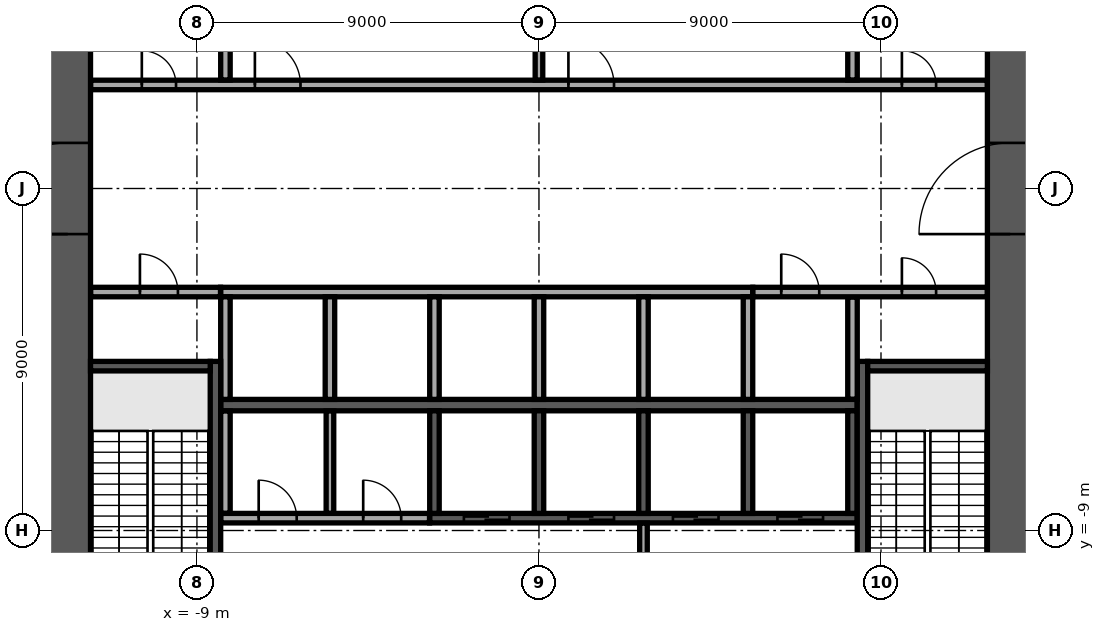
"""IFC4 building model, lengths in metres.
Left out: names, types, materials, properties, quantities, classifications, styles, units other than length and angle.
Written with IfcOpenShell. Run it as: python <this file> out.ifc"""

import sys

from ifc_helpers import new_model, si_unit, direction, frame, frame_2d, origin, place, context, subcontext, project, spatial, rectangle, extrude, element, fill, save


model = new_model("IFC4")
c1 = context("Model", 3, precision=1e-05, world=origin(), true_north=direction((0.0, 1.0)))
c2 = subcontext(c1, "Body", "Model", "MODEL_VIEW")
j1 = project(units=[si_unit("LENGTHUNIT", "METRE"), si_unit("PLANEANGLEUNIT", "RADIAN")], contexts=[c1])
p1 = place(None, origin())
s1 = spatial("IfcSite", under=j1, at=p1, CompositionType="ELEMENT")
p2 = place(p1, origin())
s2 = spatial("IfcBuilding", under=s1, at=p2, CompositionType="ELEMENT")
p3 = place(p2, frame((0.0, 0.0, 76.5)))
s3 = spatial("IfcBuildingStorey", under=s2, at=p3, CompositionType="ELEMENT", Elevation=76.5)
p4 = place(p3, frame((12.4, -11.8, 0.0), z_axis=(0.0, 0.0, 1.0), x_axis=(0.0, 1.0, 0.0)))
e1 = element("IfcWall", 1, at=p4, inside=s3, PredefinedType="SHEAR", context=c2, shape_type="SweptSolid", body=[
    extrude(rectangle(XDim=23.6, YDim=1.2, at=frame_2d((11.8, 0.0))), origin(), (0.0, 0.0, 1.0), 5.18),
])
p5 = place(p4, frame((10.6, 0.0, 0.0)))
e2 = element("IfcOpeningElement", 2, at=p5, cuts=e1, PredefinedType="OPENING", context=c2, shape_type="SweptSolid", body=[
    extrude(rectangle(XDim=2.4, YDim=2.4, at=frame_2d((1.2, 1.2))), frame((0.0, 0.61, 0.0), z_axis=(0.0, -1.0, 0.0), x_axis=(1.0, 0.0, 0.0)), (0.0, 0.0, 1.0), 1.22),
])
p6 = place(p3, frame((-12.4, -11.8, 0.0), z_axis=(0.0, 0.0, 1.0), x_axis=(0.0, 1.0, 0.0)))
e3 = element("IfcWall", 3, at=p6, inside=s3, PredefinedType="SHEAR", context=c2, shape_type="SweptSolid", body=[
    extrude(rectangle(XDim=23.6, YDim=1.2, at=frame_2d((11.8, 0.0))), origin(), (0.0, 0.0, 1.0), 5.18),
])
p7 = place(p6, frame((10.6, 0.0, 0.0)))
e4 = element("IfcOpeningElement", 4, at=p7, cuts=e3, PredefinedType="OPENING", context=c2, shape_type="SweptSolid", body=[
    extrude(rectangle(XDim=2.4, YDim=2.4, at=frame_2d((1.2, 1.2))), frame((0.0, 0.61, 0.0), z_axis=(0.0, -1.0, 0.0), x_axis=(1.0, 0.0, 0.0)), (0.0, 0.0, 1.0), 1.22),
])
p8 = place(p3, frame((-8.375, -5.7, 0.0), z_axis=(0.0, 0.0, 1.0), x_axis=(1.0, 0.0, 0.0)))
e5 = element("IfcWall", 5, at=p8, inside=s3, PredefinedType="SOLIDWALL", context=c2, shape_type="SweptSolid", body=[
    extrude(rectangle(XDim=16.75, YDim=0.3, at=frame_2d((8.375, 0.0))), origin(), (0.0, 0.0, 1.0), 5.18),
])
p9 = place(p3, frame((-8.375, -2.725, 0.0), z_axis=(0.0, 0.0, 1.0), x_axis=(1.0, 0.0, 0.0)))
e6 = element("IfcWall", 6, at=p9, inside=s3, PredefinedType="SOLIDWALL", context=c2, shape_type="SweptSolid", body=[
    extrude(rectangle(XDim=14.0, YDim=0.25, at=frame_2d((7.0, 0.0))), origin(), (0.0, 0.0, 1.0), 5.18),
])
for number, where, z_axis, x_axis in (
    (7, (-8.25, -5.55, 0.0), (0.0, 0.0, 1.0), (0.0, 1.0, 0.0)),
    (8, (-5.5, -5.55, 0.0), (0.0, 0.0, 1.0), (0.0, 1.0, 0.0)),
    (9, (-2.75, -5.55, 0.0), (0.0, 0.0, 1.0), (0.0, 1.0, 0.0)),
    (10, (0.0, -5.55, 0.0), (0.0, 0.0, 1.0), (0.0, 1.0, 0.0)),
    (11, (2.75, -5.55, 0.0), (0.0, 0.0, 1.0), (0.0, 1.0, 0.0)),
    (12, (5.5, -5.55, 0.0), (0.0, 0.0, 1.0), (0.0, 1.0, 0.0)),
):
    element("IfcWall", number, at=place(p3, frame(where, z_axis=z_axis, x_axis=x_axis)), inside=s3, PredefinedType="SOLIDWALL", context=c2, shape_type="SweptSolid", body=[
        extrude(rectangle(XDim=2.7, YDim=0.25, at=frame_2d((1.35, 0.0))), origin(), (0.0, 0.0, 1.0), 5.18),
    ])
p10 = place(p3, frame((-2.875, -8.675, 0.0), z_axis=(0.0, 0.0, 1.0), x_axis=(1.0, 0.0, 0.0)))
e13 = element("IfcWall", 13, at=p10, inside=s3, PredefinedType="SOLIDWALL", context=c2, shape_type="SweptSolid", body=[
    extrude(rectangle(XDim=11.25, YDim=0.25, at=frame_2d((5.625, 0.0))), origin(), (0.0, 0.0, 1.0), 5.18),
])
p11 = place(p10, frame((0.9, 0.0, 0.0)))
e14 = element("IfcOpeningElement", 14, at=p11, cuts=e13, PredefinedType="OPENING", context=c2, shape_type="SweptSolid", body=[
    extrude(rectangle(XDim=1.2, YDim=2.1, at=frame_2d((0.6, 1.05))), frame((0.0, 0.135, 0.0), z_axis=(0.0, -1.0, 0.0), x_axis=(1.0, 0.0, 0.0)), (0.0, 0.0, 1.0), 0.27),
])
p12 = place(p10, frame((3.65, 0.0, 0.0)))
e15 = element("IfcOpeningElement", 15, at=p12, cuts=e13, PredefinedType="OPENING", context=c2, shape_type="SweptSolid", body=[
    extrude(rectangle(XDim=1.2, YDim=2.1, at=frame_2d((0.6, 1.05))), frame((0.0, 0.135, 0.0), z_axis=(0.0, -1.0, 0.0), x_axis=(1.0, 0.0, 0.0)), (0.0, 0.0, 1.0), 0.27),
])
p13 = place(p10, frame((6.4, 0.0, 0.0)))
e16 = element("IfcOpeningElement", 16, at=p13, cuts=e13, PredefinedType="OPENING", context=c2, shape_type="SweptSolid", body=[
    extrude(rectangle(XDim=1.2, YDim=2.1, at=frame_2d((0.6, 1.05))), frame((0.0, 0.135, 0.0), z_axis=(0.0, -1.0, 0.0), x_axis=(1.0, 0.0, 0.0)), (0.0, 0.0, 1.0), 0.27),
])
p14 = place(p10, frame((9.15, 0.0, 0.0)))
e17 = element("IfcOpeningElement", 17, at=p14, cuts=e13, PredefinedType="OPENING", context=c2, shape_type="SweptSolid", body=[
    extrude(rectangle(XDim=1.2, YDim=2.1, at=frame_2d((0.6, 1.05))), frame((0.0, 0.135, 0.0), z_axis=(0.0, -1.0, 0.0), x_axis=(1.0, 0.0, 0.0)), (0.0, 0.0, 1.0), 0.27),
])
for number, where, z_axis, x_axis in (
    (18, (-2.75, -8.55, 0.0), (0.0, 0.0, 1.0), (0.0, 1.0, 0.0)),
    (19, (0.0, -8.55, 0.0), (0.0, 0.0, 1.0), (0.0, 1.0, 0.0)),
    (20, (2.75, -8.55, 0.0), (0.0, 0.0, 1.0), (0.0, 1.0, 0.0)),
    (21, (5.5, -8.55, 0.0), (0.0, 0.0, 1.0), (0.0, 1.0, 0.0)),
    (22, (8.25, -8.55, 0.0), (0.0, 0.0, 1.0), (0.0, 1.0, 0.0)),
):
    element("IfcWall", number, at=place(p3, frame(where, z_axis=z_axis, x_axis=x_axis)), inside=s3, PredefinedType="SOLIDWALL", context=c2, shape_type="SweptSolid", body=[
        extrude(rectangle(XDim=2.7, YDim=0.25, at=frame_2d((1.35, 0.0))), origin(), (0.0, 0.0, 1.0), 5.18),
    ])
p15 = place(p3, frame((-8.512, -4.55, 0.0), z_axis=(0.0, 0.0, 1.0), x_axis=(0.0, -1.0, 0.0)))
e23 = element("IfcWall", 23, at=p15, inside=s3, PredefinedType="SOLIDWALL", context=c2, shape_type="SweptSolid", body=[
    extrude(rectangle(XDim=7.25, YDim=0.275, at=frame_2d((3.625, 0.0))), origin(), (0.0, 0.0, 1.0), 5.18),
])
p16 = place(p15, frame((6.0, 0.0, 0.0)))
e24 = element("IfcOpeningElement", 24, at=p16, cuts=e23, PredefinedType="OPENING", context=c2, shape_type="SweptSolid", body=[
    extrude(rectangle(XDim=1.0, YDim=2.1, at=frame_2d((0.5, 1.05))), frame((0.0, 0.147, 0.0), z_axis=(0.0, -1.0, 0.0), x_axis=(1.0, 0.0, 0.0)), (0.0, 0.0, 1.0), 0.295),
])
p17 = place(p3, frame((-8.65, -4.675, 0.0), z_axis=(0.0, 0.0, 1.0), x_axis=(-1.0, 0.0, 0.0)))
e25 = element("IfcWall", 25, at=p17, inside=s3, PredefinedType="SOLIDWALL", context=c2, shape_type="SweptSolid", body=[
    extrude(rectangle(XDim=3.15, YDim=0.25, at=frame_2d((1.575, 0.0))), origin(), (0.0, 0.0, 1.0), 5.18),
])
p18 = place(p3, frame((8.512, -4.55, 0.0), z_axis=(0.0, 0.0, 1.0), x_axis=(0.0, -1.0, 0.0)))
e26 = element("IfcWall", 26, at=p18, inside=s3, PredefinedType="SOLIDWALL", context=c2, shape_type="SweptSolid", body=[
    extrude(rectangle(XDim=7.25, YDim=0.275, at=frame_2d((3.625, 0.0))), origin(), (0.0, 0.0, 1.0), 5.18),
])
p19 = place(p18, frame((6.0, 0.0, 0.0)))
e27 = element("IfcOpeningElement", 27, at=p19, cuts=e26, PredefinedType="OPENING", context=c2, shape_type="SweptSolid", body=[
    extrude(rectangle(XDim=1.0, YDim=2.1, at=frame_2d((0.5, 1.05))), frame((0.0, 0.147, 0.0), z_axis=(0.0, -1.0, 0.0), x_axis=(1.0, 0.0, 0.0)), (0.0, 0.0, 1.0), 0.295),
])
p20 = place(p3, frame((8.65, -4.675, 0.0), z_axis=(0.0, 0.0, 1.0), x_axis=(1.0, 0.0, 0.0)))
e28 = element("IfcWall", 28, at=p20, inside=s3, PredefinedType="SOLIDWALL", context=c2, shape_type="SweptSolid", body=[
    extrude(rectangle(XDim=3.15, YDim=0.25, at=frame_2d((1.575, 0.0))), origin(), (0.0, 0.0, 1.0), 5.18),
])
p21 = place(p3, frame((2.75, -11.795, 0.0), z_axis=(0.0, 0.0, 1.0), x_axis=(0.0, 1.0, 0.0)))
e29 = element("IfcWall", 29, at=p21, inside=s3, PredefinedType="PARTITIONING", context=c2, shape_type="SweptSolid", body=[
    extrude(rectangle(XDim=2.99, YDim=0.2, at=frame_2d((1.495, 0.0))), origin(), (0.0, 0.0, 1.0), 5.18),
])
p22 = place(p3, frame((-8.37, -8.675, 0.0), z_axis=(0.0, 0.0, 1.0), x_axis=(1.0, 0.0, 0.0)))
e30 = element("IfcWall", 30, at=p22, inside=s3, PredefinedType="PARTITIONING", context=c2, shape_type="SweptSolid", body=[
    extrude(rectangle(XDim=5.49, YDim=0.25, at=frame_2d((2.745, 0.0))), origin(), (0.0, 0.0, 1.0), 5.18),
])
p23 = place(p22, frame((0.995, 0.0, 0.0)))
e31 = element("IfcOpeningElement", 31, at=p23, cuts=e30, PredefinedType="OPENING", context=c2, shape_type="SweptSolid", body=[
    extrude(rectangle(XDim=1.0, YDim=2.1, at=frame_2d((0.5, 1.05))), frame((0.0, 0.135, 0.0), z_axis=(0.0, -1.0, 0.0), x_axis=(1.0, 0.0, 0.0)), (0.0, 0.0, 1.0), 0.27),
])
p24 = place(p22, frame((3.745, 0.0, 0.0)))
e32 = element("IfcOpeningElement", 32, at=p24, cuts=e30, PredefinedType="OPENING", context=c2, shape_type="SweptSolid", body=[
    extrude(rectangle(XDim=1.0, YDim=2.1, at=frame_2d((0.5, 1.05))), frame((0.0, 0.135, 0.0), z_axis=(0.0, -1.0, 0.0), x_axis=(1.0, 0.0, 0.0)), (0.0, 0.0, 1.0), 0.27),
])
p25 = place(p3, frame((-8.25, -8.545, 0.0), z_axis=(0.0, 0.0, 1.0), x_axis=(0.0, 1.0, 0.0)))
e33 = element("IfcWall", 33, at=p25, inside=s3, PredefinedType="PARTITIONING", context=c2, shape_type="SweptSolid", body=[
    extrude(rectangle(XDim=2.69, YDim=0.25, at=frame_2d((1.345, 0.0))), origin(), (0.0, 0.0, 1.0), 5.18),
])
p26 = place(p3, frame((-5.5, -8.545, 0.0), z_axis=(0.0, 0.0, 1.0), x_axis=(0.0, 1.0, 0.0)))
e34 = element("IfcWall", 34, at=p26, inside=s3, PredefinedType="PARTITIONING", context=c2, shape_type="SweptSolid", body=[
    extrude(rectangle(XDim=2.69, YDim=0.2, at=frame_2d((1.345, 0.0))), origin(), (0.0, 0.0, 1.0), 5.18),
])
p27 = place(p3, frame((8.25, -5.545, 0.0), z_axis=(0.0, 0.0, 1.0), x_axis=(0.0, 1.0, 0.0)))
e35 = element("IfcWall", 35, at=p27, inside=s3, PredefinedType="PARTITIONING", context=c2, shape_type="SweptSolid", body=[
    extrude(rectangle(XDim=2.69, YDim=0.25, at=frame_2d((1.345, 0.0))), origin(), (0.0, 0.0, 1.0), 5.18),
])
p28 = place(p3, frame((-11.795, -2.725, 0.0), z_axis=(0.0, 0.0, 1.0), x_axis=(1.0, 0.0, 0.0)))
e36 = element("IfcWall", 36, at=p28, inside=s3, PredefinedType="PARTITIONING", context=c2, shape_type="SweptSolid", body=[
    extrude(rectangle(XDim=3.415, YDim=0.25, at=frame_2d((1.708, 0.0))), origin(), (0.0, 0.0, 1.0), 5.18),
])
p29 = place(p28, frame((1.295, 0.0, 0.0)))
e37 = element("IfcOpeningElement", 37, at=p29, cuts=e36, PredefinedType="OPENING", context=c2, shape_type="SweptSolid", body=[
    extrude(rectangle(XDim=1.0, YDim=2.1, at=frame_2d((0.5, 1.05))), frame((0.0, 0.135, 0.0), z_axis=(0.0, -1.0, 0.0), x_axis=(1.0, 0.0, 0.0)), (0.0, 0.0, 1.0), 0.27),
])
p30 = place(p3, frame((5.63, -2.725, 0.0), z_axis=(0.0, 0.0, 1.0), x_axis=(1.0, 0.0, 0.0)))
e38 = element("IfcWall", 38, at=p30, inside=s3, PredefinedType="PARTITIONING", context=c2, shape_type="SweptSolid", body=[
    extrude(rectangle(XDim=6.165, YDim=0.25, at=frame_2d((3.083, 0.0))), origin(), (0.0, 0.0, 1.0), 5.18),
])
p31 = place(p30, frame((0.745, 0.0, 0.0)))
e39 = element("IfcOpeningElement", 39, at=p31, cuts=e38, PredefinedType="OPENING", context=c2, shape_type="SweptSolid", body=[
    extrude(rectangle(XDim=1.0, YDim=2.1, at=frame_2d((0.5, 1.05))), frame((0.0, 0.135, 0.0), z_axis=(0.0, -1.0, 0.0), x_axis=(1.0, 0.0, 0.0)), (0.0, 0.0, 1.0), 0.27),
])
p32 = place(p30, frame((3.92, 0.0, 0.0)))
e40 = element("IfcOpeningElement", 40, at=p32, cuts=e38, PredefinedType="OPENING", context=c2, shape_type="SweptSolid", body=[
    extrude(rectangle(XDim=0.9, YDim=2.1, at=frame_2d((0.45, 1.05))), frame((0.0, 0.135, 0.0), z_axis=(0.0, -1.0, 0.0), x_axis=(1.0, 0.0, 0.0)), (0.0, 0.0, 1.0), 0.27),
])
p33 = place(p3, frame((-11.795, 2.725, 0.0), z_axis=(0.0, 0.0, 1.0), x_axis=(1.0, 0.0, 0.0)))
e41 = element("IfcWall", 41, at=p33, inside=s3, PredefinedType="PARTITIONING", context=c2, shape_type="SweptSolid", body=[
    extrude(rectangle(XDim=23.59, YDim=0.25, at=frame_2d((11.795, 0.0))), origin(), (0.0, 0.0, 1.0), 5.18),
])
p34 = place(p33, frame((21.345, 0.0, 0.0)))
e42 = element("IfcOpeningElement", 42, at=p34, cuts=e41, PredefinedType="OPENING", context=c2, shape_type="SweptSolid", body=[
    extrude(rectangle(XDim=0.9, YDim=2.1, at=frame_2d((0.45, 1.05))), frame((0.0, 0.135, 0.0), z_axis=(0.0, -1.0, 0.0), x_axis=(1.0, 0.0, 0.0)), (0.0, 0.0, 1.0), 0.27),
])
p35 = place(p33, frame((1.345, 0.0, 0.0)))
e43 = element("IfcOpeningElement", 43, at=p35, cuts=e41, PredefinedType="OPENING", context=c2, shape_type="SweptSolid", body=[
    extrude(rectangle(XDim=0.9, YDim=2.1, at=frame_2d((0.45, 1.05))), frame((0.0, 0.135, 0.0), z_axis=(0.0, -1.0, 0.0), x_axis=(1.0, 0.0, 0.0)), (0.0, 0.0, 1.0), 0.27),
])
p36 = place(p33, frame((4.32, 0.0, 0.0)))
e44 = element("IfcOpeningElement", 44, at=p36, cuts=e41, PredefinedType="OPENING", context=c2, shape_type="SweptSolid", body=[
    extrude(rectangle(XDim=1.2, YDim=2.1, at=frame_2d((0.6, 1.05))), frame((0.0, 0.135, 0.0), z_axis=(0.0, -1.0, 0.0), x_axis=(1.0, 0.0, 0.0)), (0.0, 0.0, 1.0), 0.27),
])
p37 = place(p33, frame((12.57, 0.0, 0.0)))
e45 = element("IfcOpeningElement", 45, at=p37, cuts=e41, PredefinedType="OPENING", context=c2, shape_type="SweptSolid", body=[
    extrude(rectangle(XDim=1.2, YDim=2.1, at=frame_2d((0.6, 1.05))), frame((0.0, 0.135, 0.0), z_axis=(0.0, -1.0, 0.0), x_axis=(1.0, 0.0, 0.0)), (0.0, 0.0, 1.0), 0.27),
])
p38 = place(p3, frame((-8.25, 2.855, 0.0), z_axis=(0.0, 0.0, 1.0), x_axis=(0.0, 1.0, 0.0)))
e46 = element("IfcWall", 46, at=p38, inside=s3, PredefinedType="PARTITIONING", context=c2, shape_type="SweptSolid", body=[
    extrude(rectangle(XDim=1.715, YDim=0.25, at=frame_2d((0.857, 0.0))), origin(), (0.0, 0.0, 1.0), 5.18),
])
p39 = place(p3, frame((0.0, 2.855, 0.0), z_axis=(0.0, 0.0, 1.0), x_axis=(0.0, 1.0, 0.0)))
e47 = element("IfcWall", 47, at=p39, inside=s3, PredefinedType="PARTITIONING", context=c2, shape_type="SweptSolid", body=[
    extrude(rectangle(XDim=2.69, YDim=0.2, at=frame_2d((1.345, 0.0))), origin(), (0.0, 0.0, 1.0), 5.18),
])
p40 = place(p3, frame((8.25, 2.855, 0.0), z_axis=(0.0, 0.0, 1.0), x_axis=(0.0, 1.0, 0.0)))
e48 = element("IfcWall", 48, at=p40, inside=s3, PredefinedType="PARTITIONING", context=c2, shape_type="SweptSolid", body=[
    extrude(rectangle(XDim=2.69, YDim=0.25, at=frame_2d((1.345, 0.0))), origin(), (0.0, 0.0, 1.0), 5.18),
])
p41 = place(p5, origin())
e49 = element("IfcDoor", 49, at=p41, inside=s3, OperationType="SINGLE_SWING_LEFT", PredefinedType="DOOR", context=c2, shape_type="SweptSolid", body=[
    extrude(rectangle(XDim=2.4, YDim=2.4, at=frame_2d((1.2, 1.2))), frame((0.0, 0.025, 0.0), z_axis=(0.0, -1.0, 0.0), x_axis=(1.0, 0.0, 0.0)), (0.0, 0.0, 1.0), 0.05),
])
fill(e2, e49)
p42 = place(p7, origin())
e50 = element("IfcDoor", 50, at=p42, inside=s3, OperationType="SINGLE_SWING_LEFT", PredefinedType="DOOR", context=c2, shape_type="SweptSolid", body=[
    extrude(rectangle(XDim=2.4, YDim=2.4, at=frame_2d((1.2, 1.2))), frame((0.0, 0.025, 0.0), z_axis=(0.0, -1.0, 0.0), x_axis=(1.0, 0.0, 0.0)), (0.0, 0.0, 1.0), 0.05),
])
fill(e4, e50)
p43 = place(p11, origin())
e51 = element("IfcDoor", 51, at=p43, inside=s3, OperationType="DOUBLE_DOOR_SLIDING", PredefinedType="DOOR", context=c2, shape_type="SweptSolid", body=[
    extrude(rectangle(XDim=1.2, YDim=2.1, at=frame_2d((0.6, 1.05))), frame((0.0, 0.025, 0.0), z_axis=(0.0, -1.0, 0.0), x_axis=(1.0, 0.0, 0.0)), (0.0, 0.0, 1.0), 0.05),
])
fill(e14, e51)
p44 = place(p12, origin())
e52 = element("IfcDoor", 52, at=p44, inside=s3, OperationType="DOUBLE_DOOR_SLIDING", PredefinedType="DOOR", context=c2, shape_type="SweptSolid", body=[
    extrude(rectangle(XDim=1.2, YDim=2.1, at=frame_2d((0.6, 1.05))), frame((0.0, 0.025, 0.0), z_axis=(0.0, -1.0, 0.0), x_axis=(1.0, 0.0, 0.0)), (0.0, 0.0, 1.0), 0.05),
])
fill(e15, e52)
p45 = place(p13, origin())
e53 = element("IfcDoor", 53, at=p45, inside=s3, OperationType="DOUBLE_DOOR_SLIDING", PredefinedType="DOOR", context=c2, shape_type="SweptSolid", body=[
    extrude(rectangle(XDim=1.2, YDim=2.1, at=frame_2d((0.6, 1.05))), frame((0.0, 0.025, 0.0), z_axis=(0.0, -1.0, 0.0), x_axis=(1.0, 0.0, 0.0)), (0.0, 0.0, 1.0), 0.05),
])
fill(e16, e53)
p46 = place(p14, origin())
e54 = element("IfcDoor", 54, at=p46, inside=s3, OperationType="DOUBLE_DOOR_SLIDING", PredefinedType="DOOR", context=c2, shape_type="SweptSolid", body=[
    extrude(rectangle(XDim=1.2, YDim=2.1, at=frame_2d((0.6, 1.05))), frame((0.0, 0.025, 0.0), z_axis=(0.0, -1.0, 0.0), x_axis=(1.0, 0.0, 0.0)), (0.0, 0.0, 1.0), 0.05),
])
fill(e17, e54)
p47 = place(p23, origin())
e55 = element("IfcDoor", 55, at=p47, inside=s3, OperationType="SINGLE_SWING_RIGHT", PredefinedType="DOOR", context=c2, shape_type="SweptSolid", body=[
    extrude(rectangle(XDim=1.0, YDim=2.1, at=frame_2d((0.5, 1.05))), frame((0.0, 0.025, 0.0), z_axis=(0.0, -1.0, 0.0), x_axis=(1.0, 0.0, 0.0)), (0.0, 0.0, 1.0), 0.05),
])
fill(e31, e55)
p48 = place(p24, origin())
e56 = element("IfcDoor", 56, at=p48, inside=s3, OperationType="SINGLE_SWING_RIGHT", PredefinedType="DOOR", context=c2, shape_type="SweptSolid", body=[
    extrude(rectangle(XDim=1.0, YDim=2.1, at=frame_2d((0.5, 1.05))), frame((0.0, 0.025, 0.0), z_axis=(0.0, -1.0, 0.0), x_axis=(1.0, 0.0, 0.0)), (0.0, 0.0, 1.0), 0.05),
])
fill(e32, e56)
p49 = place(p29, origin())
e57 = element("IfcDoor", 57, at=p49, inside=s3, OperationType="SINGLE_SWING_RIGHT", PredefinedType="DOOR", context=c2, shape_type="SweptSolid", body=[
    extrude(rectangle(XDim=1.0, YDim=2.1, at=frame_2d((0.5, 1.05))), frame((0.0, 0.025, 0.0), z_axis=(0.0, -1.0, 0.0), x_axis=(1.0, 0.0, 0.0)), (0.0, 0.0, 1.0), 0.05),
])
fill(e37, e57)
p50 = place(p31, origin())
e58 = element("IfcDoor", 58, at=p50, inside=s3, OperationType="SINGLE_SWING_RIGHT", PredefinedType="DOOR", context=c2, shape_type="SweptSolid", body=[
    extrude(rectangle(XDim=1.0, YDim=2.1, at=frame_2d((0.5, 1.05))), frame((0.0, 0.025, 0.0), z_axis=(0.0, -1.0, 0.0), x_axis=(1.0, 0.0, 0.0)), (0.0, 0.0, 1.0), 0.05),
])
fill(e39, e58)
p51 = place(p34, origin())
e59 = element("IfcDoor", 59, at=p51, inside=s3, OperationType="SINGLE_SWING_RIGHT", PredefinedType="DOOR", context=c2, shape_type="SweptSolid", body=[
    extrude(rectangle(XDim=0.9, YDim=2.1, at=frame_2d((0.45, 1.05))), frame((0.0, 0.025, 0.0), z_axis=(0.0, -1.0, 0.0), x_axis=(1.0, 0.0, 0.0)), (0.0, 0.0, 1.0), 0.05),
])
fill(e42, e59)
p52 = place(p32, origin())
e60 = element("IfcDoor", 60, at=p52, inside=s3, OperationType="SINGLE_SWING_RIGHT", PredefinedType="DOOR", context=c2, shape_type="SweptSolid", body=[
    extrude(rectangle(XDim=0.9, YDim=2.1, at=frame_2d((0.45, 1.05))), frame((0.0, 0.025, 0.0), z_axis=(0.0, -1.0, 0.0), x_axis=(1.0, 0.0, 0.0)), (0.0, 0.0, 1.0), 0.05),
])
fill(e40, e60)
p53 = place(p35, origin())
e61 = element("IfcDoor", 61, at=p53, inside=s3, OperationType="SINGLE_SWING_RIGHT", PredefinedType="DOOR", context=c2, shape_type="SweptSolid", body=[
    extrude(rectangle(XDim=0.9, YDim=2.1, at=frame_2d((0.45, 1.05))), frame((0.0, 0.025, 0.0), z_axis=(0.0, -1.0, 0.0), x_axis=(1.0, 0.0, 0.0)), (0.0, 0.0, 1.0), 0.05),
])
fill(e43, e61)
p54 = place(p36, origin())
e62 = element("IfcDoor", 62, at=p54, inside=s3, OperationType="SINGLE_SWING_LEFT", PredefinedType="DOOR", context=c2, shape_type="SweptSolid", body=[
    extrude(rectangle(XDim=1.2, YDim=2.1, at=frame_2d((0.6, 1.05))), frame((0.0, 0.025, 0.0), z_axis=(0.0, -1.0, 0.0), x_axis=(1.0, 0.0, 0.0)), (0.0, 0.0, 1.0), 0.05),
])
fill(e44, e62)
p55 = place(p37, origin())
e63 = element("IfcDoor", 63, at=p55, inside=s3, OperationType="SINGLE_SWING_LEFT", PredefinedType="DOOR", context=c2, shape_type="SweptSolid", body=[
    extrude(rectangle(XDim=1.2, YDim=2.1, at=frame_2d((0.6, 1.05))), frame((0.0, 0.025, 0.0), z_axis=(0.0, -1.0, 0.0), x_axis=(1.0, 0.0, 0.0)), (0.0, 0.0, 1.0), 0.05),
])
fill(e45, e63)
save(model, sys.argv[1])
